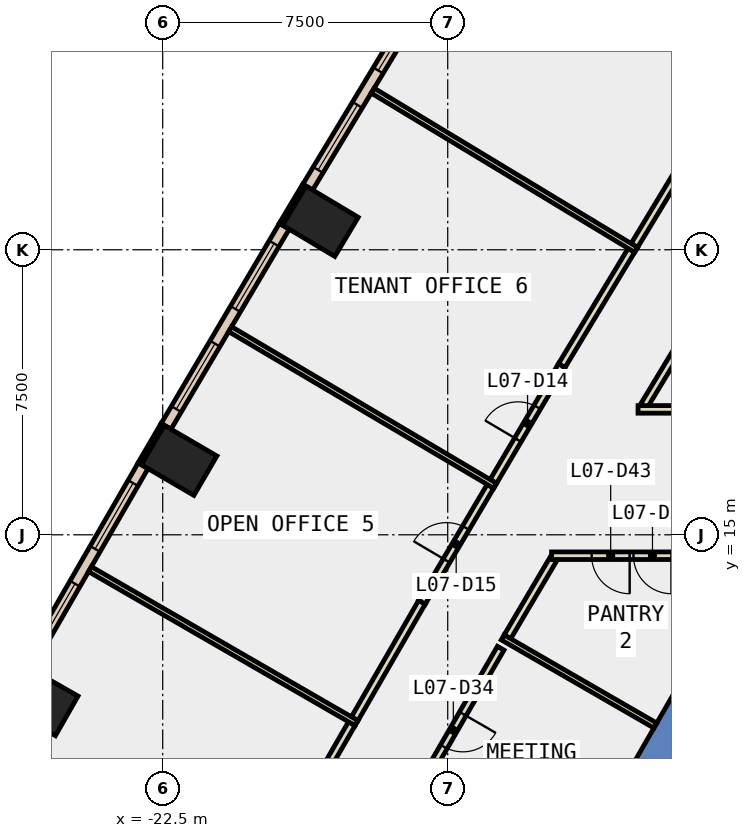
"""IFC4 building model, lengths in metres.
Left out: names, types, materials, properties, quantities, classifications, styles, units other than length and angle.
Written with IfcOpenShell. Run it as: python <this file> out.ifc"""

import sys

from ifc_helpers import new_model, si_unit, direction, frame, frame_2d, origin, origin_2d, place, context, subcontext, project, spatial, polyline, rectangle, outline, extrude, element, fill, save


model = new_model("IFC4")
c1 = context("Model", 3, precision=1e-05, world=origin(), true_north=direction((0.0, 1.0)))
c2 = subcontext(c1, "Body", "Model", "MODEL_VIEW")
j1 = project(units=[si_unit("LENGTHUNIT", "METRE"), si_unit("PLANEANGLEUNIT", "RADIAN")], contexts=[c1])
p1 = place(None, origin())
s1 = spatial("IfcSite", under=j1, at=p1, CompositionType="ELEMENT")
p2 = place(p1, origin())
s2 = spatial("IfcBuilding", under=s1, at=p2, CompositionType="ELEMENT")
p3 = place(p2, frame((0.0, 0.0, 39.2)))
s3 = spatial("IfcBuildingStorey", under=s2, at=p3, CompositionType="ELEMENT", Elevation=39.2)
for number, where, z_axis, x_axis in (
    (1, (-18.35, 23.25, -0.4), (0.0, 0.0, 1.0), (0.513, 0.858, 0.0)),
    (2, (-22.068, 16.959, -0.4), (0.0, 0.0, 1.0), (0.504, 0.864, 0.0)),
    (3, (-25.721, 10.632, -0.4), (0.0, 0.0, 1.0), (0.496, 0.869, 0.0)),
):
    element("IfcColumn", number, at=place(p3, frame(where, z_axis=z_axis, x_axis=x_axis)), inside=s3, PredefinedType="COLUMN", context=c2, shape_type="SweptSolid", body=[
        extrude(rectangle(XDim=1.2, YDim=1.6, at=origin_2d()), origin(), (0.0, 0.0, 1.0), 4.2),
    ])
p4 = place(p3, frame((0.0, 0.0, -0.4)))
e4 = element("IfcWall", 4, at=p4, inside=s3, PredefinedType="SHEAR", context=c2, shape_type="SweptSolid", body=[
    extrude(outline(polyline([(-12.267, 5.252), (-11.402, 4.752), (-6.351, 13.5), (-6.928, 14.5), (-12.267, 5.252)])), origin(), (0.0, 0.0, 1.0), 4.2),
])
p5 = place(p3, frame((-18.772, 24.201, 0.0), z_axis=(0.0, 0.0, 1.0), x_axis=(-0.513238760752, -0.858245870635, 0.0)))
e5 = element("IfcWall", 5, at=p5, inside=s3, PredefinedType="STANDARD", context=c2, shape_type="SweptSolid", body=[
    extrude(rectangle(XDim=1.2, YDim=0.1, at=frame_2d((0.6, 0.0))), origin(), (0.0, 0.0, 1.0), 3.8),
])
p6 = place(p3, frame((-22.499, 17.906, 0.0), z_axis=(0.0, 0.0, 1.0), x_axis=(-0.504313844903, -0.863520437418, 0.0)))
e6 = element("IfcWall", 6, at=p6, inside=s3, PredefinedType="STANDARD", context=c2, shape_type="SweptSolid", body=[
    extrude(rectangle(XDim=1.2, YDim=0.1, at=frame_2d((0.6, 0.0))), origin(), (0.0, 0.0, 1.0), 3.8),
])
p7 = place(p3, frame((-15.521, 29.382, 0.0), z_axis=(0.0, 0.0, 1.0), x_axis=(-0.517211293816, -0.855857743757, 0.0)))
e7 = element("IfcWall", 7, at=p7, inside=s3, PredefinedType="STANDARD", context=c2, shape_type="SweptSolid", body=[
    extrude(rectangle(XDim=6.116, YDim=0.3, at=frame_2d((3.058, 0.0))), origin(), (0.0, 0.0, 1.0), 3.8),
])
p8 = place(p7, frame((0.529, 0.0, 0.9)))
e8 = element("IfcOpeningElement", 8, at=p8, cuts=e7, PredefinedType="OPENING", context=c2, shape_type="SweptSolid", body=[
    extrude(rectangle(XDim=2.0, YDim=2.6, at=frame_2d((1.0, 1.3))), frame((0.0, 0.16, 0.0), z_axis=(0.0, -1.0, 0.0), x_axis=(1.0, 0.0, 0.0)), (0.0, 0.0, 1.0), 0.32),
])
p9 = place(p7, frame((3.587, 0.0, 0.9)))
e9 = element("IfcOpeningElement", 9, at=p9, cuts=e7, PredefinedType="OPENING", context=c2, shape_type="SweptSolid", body=[
    extrude(rectangle(XDim=2.0, YDim=2.6, at=frame_2d((1.0, 1.3))), frame((0.0, 0.16, 0.0), z_axis=(0.0, -1.0, 0.0), x_axis=(1.0, 0.0, 0.0)), (0.0, 0.0, 1.0), 0.32),
])
p10 = place(p3, frame((-19.299, 23.119, 0.0), z_axis=(0.0, 0.0, 1.0), x_axis=(-0.508749483145, -0.860914608658, 0.0)))
e10 = element("IfcWall", 10, at=p10, inside=s3, PredefinedType="STANDARD", context=c2, shape_type="SweptSolid", body=[
    extrude(rectangle(XDim=6.117, YDim=0.3, at=frame_2d((3.058, 0.0))), origin(), (0.0, 0.0, 1.0), 3.8),
])
p11 = place(p10, frame((0.529, 0.0, 0.9)))
e11 = element("IfcOpeningElement", 11, at=p11, cuts=e10, PredefinedType="OPENING", context=c2, shape_type="SweptSolid", body=[
    extrude(rectangle(XDim=2.0, YDim=2.6, at=frame_2d((1.0, 1.3))), frame((0.0, 0.16, 0.0), z_axis=(0.0, -1.0, 0.0), x_axis=(1.0, 0.0, 0.0)), (0.0, 0.0, 1.0), 0.32),
])
p12 = place(p10, frame((3.588, 0.0, 0.9)))
e12 = element("IfcOpeningElement", 12, at=p12, cuts=e10, PredefinedType="OPENING", context=c2, shape_type="SweptSolid", body=[
    extrude(rectangle(XDim=2.0, YDim=2.6, at=frame_2d((1.0, 1.3))), frame((0.0, 0.16, 0.0), z_axis=(0.0, -1.0, 0.0), x_axis=(1.0, 0.0, 0.0)), (0.0, 0.0, 1.0), 0.32),
])
p13 = place(p3, frame((-23.015, 16.819, 0.0), z_axis=(0.0, 0.0, 1.0), x_axis=(-0.499976985038, -0.866038691071, 0.0)))
e13 = element("IfcWall", 13, at=p13, inside=s3, PredefinedType="STANDARD", context=c2, shape_type="SweptSolid", body=[
    extrude(rectangle(XDim=6.116, YDim=0.3, at=frame_2d((3.058, 0.0))), origin(), (0.0, 0.0, 1.0), 3.8),
])
p14 = place(p13, frame((0.529, 0.0, 0.9)))
e14 = element("IfcOpeningElement", 14, at=p14, cuts=e13, PredefinedType="OPENING", context=c2, shape_type="SweptSolid", body=[
    extrude(rectangle(XDim=2.0, YDim=2.6, at=frame_2d((1.0, 1.3))), frame((0.0, 0.16, 0.0), z_axis=(0.0, -1.0, 0.0), x_axis=(1.0, 0.0, 0.0)), (0.0, 0.0, 1.0), 0.32),
])
p15 = place(p13, frame((3.587, 0.0, 0.9)))
e15 = element("IfcOpeningElement", 15, at=p15, cuts=e13, PredefinedType="OPENING", context=c2, shape_type="SweptSolid", body=[
    extrude(rectangle(XDim=2.0, YDim=2.6, at=frame_2d((1.0, 1.3))), frame((0.0, 0.16, 0.0), z_axis=(0.0, -1.0, 0.0), x_axis=(1.0, 0.0, 0.0)), (0.0, 0.0, 1.0), 0.32),
])
p16 = place(p3, frame((-13.606, 12.016, 0.0), z_axis=(0.0, 0.0, 1.0), x_axis=(-0.499992180995, -0.866029918042, 0.0)))
e16 = element("IfcWall", 16, at=p16, inside=s3, PredefinedType="PARTITIONING", context=c2, shape_type="SweptSolid", body=[
    extrude(rectangle(XDim=4.988, YDim=0.2, at=frame_2d((2.494, 0.0))), origin(), (0.0, 0.0, 1.0), 3.8),
])
p17 = place(p16, frame((1.994, 0.0, 0.0)))
e17 = element("IfcOpeningElement", 17, at=p17, cuts=e16, PredefinedType="OPENING", context=c2, shape_type="SweptSolid", body=[
    extrude(rectangle(XDim=1.0, YDim=2.1, at=frame_2d((0.5, 1.05))), frame((0.0, 0.11, 0.0), z_axis=(0.0, -1.0, 0.0), x_axis=(1.0, 0.0, 0.0)), (0.0, 0.0, 1.0), 0.22),
])
p18 = place(p3, frame((-12.218, 14.364, 0.0), z_axis=(0.0, 0.0, 1.0), x_axis=(-0.508767325294, -0.860904064756, 0.0)))
e18 = element("IfcWall", 18, at=p18, inside=s3, PredefinedType="PARTITIONING", context=c2, shape_type="SweptSolid", body=[
    extrude(rectangle(XDim=2.38, YDim=0.2, at=frame_2d((1.19, 0.0))), origin(), (0.0, 0.0, 1.0), 3.8),
])
p19 = place(p3, frame((-6.209, 24.392, 0.0), z_axis=(0.0, 0.0, 1.0), x_axis=(-0.51736780002, -0.85576314451, 0.0)))
e19 = element("IfcWall", 19, at=p19, inside=s3, PredefinedType="PARTITIONING", context=c2, shape_type="SweptSolid", body=[
    extrude(rectangle(XDim=7.018, YDim=0.2, at=frame_2d((3.509, 0.0))), origin(), (0.0, 0.0, 1.0), 3.8),
])
p20 = place(p3, frame((-10.089, 22.613, 0.0), z_axis=(0.0, 0.0, 1.0), x_axis=(0.517280808896, 0.855815730603, 0.0)))
e20 = element("IfcWall", 20, at=p20, inside=s3, PredefinedType="PARTITIONING", context=c2, shape_type="SweptSolid", body=[
    extrude(rectangle(XDim=3.542, YDim=0.2, at=frame_2d((1.771, 0.0))), origin(), (0.0, 0.0, 1.0), 3.8),
])
p21 = place(p3, frame((-13.8, 16.404, 0.0), z_axis=(0.0, 0.0, 1.0), x_axis=(0.508666621784, 0.860963569428, 0.0)))
e21 = element("IfcWall", 21, at=p21, inside=s3, PredefinedType="PARTITIONING", context=c2, shape_type="SweptSolid", body=[
    extrude(rectangle(XDim=3.542, YDim=0.2, at=frame_2d((1.771, 0.0))), origin(), (0.0, 0.0, 1.0), 3.8),
])
p22 = place(p21, frame((1.271, 0.0, 0.0)))
e22 = element("IfcOpeningElement", 22, at=p22, cuts=e21, PredefinedType="OPENING", context=c2, shape_type="SweptSolid", body=[
    extrude(rectangle(XDim=1.0, YDim=2.1, at=frame_2d((0.5, 1.05))), frame((0.0, 0.11, 0.0), z_axis=(0.0, -1.0, 0.0), x_axis=(1.0, 0.0, 0.0)), (0.0, 0.0, 1.0), 0.22),
])
p23 = place(p3, frame((-11.998, 19.454, 0.0), z_axis=(0.0, 0.0, 1.0), x_axis=(0.51707881094, 0.85593779171, 0.0)))
e23 = element("IfcWall", 23, at=p23, inside=s3, PredefinedType="PARTITIONING", context=c2, shape_type="SweptSolid", body=[
    extrude(rectangle(XDim=3.541, YDim=0.2, at=frame_2d((1.771, 0.0))), origin(), (0.0, 0.0, 1.0), 3.8),
])
p24 = place(p3, frame((-17.448, 10.16, 0.0), z_axis=(0.0, 0.0, 1.0), x_axis=(0.499951278228, 0.866053531485, 0.0)))
e24 = element("IfcWall", 24, at=p24, inside=s3, PredefinedType="PARTITIONING", context=c2, shape_type="SweptSolid", body=[
    extrude(rectangle(XDim=3.54, YDim=0.2, at=frame_2d((1.77, 0.0))), origin(), (0.0, 0.0, 1.0), 3.8),
])
p25 = place(p3, frame((-15.678, 13.226, 0.0), z_axis=(0.0, 0.0, 1.0), x_axis=(0.508613166028, 0.860995149431, 0.0)))
e25 = element("IfcWall", 25, at=p25, inside=s3, PredefinedType="PARTITIONING", context=c2, shape_type="SweptSolid", body=[
    extrude(rectangle(XDim=3.541, YDim=0.2, at=frame_2d((1.771, 0.0))), origin(), (0.0, 0.0, 1.0), 3.8),
])
p26 = place(p25, frame((1.271, 0.0, 0.0)))
e26 = element("IfcOpeningElement", 26, at=p26, cuts=e25, PredefinedType="OPENING", context=c2, shape_type="SweptSolid", body=[
    extrude(rectangle(XDim=1.0, YDim=2.1, at=frame_2d((0.5, 1.05))), frame((0.0, 0.11, 0.0), z_axis=(0.0, -1.0, 0.0), x_axis=(1.0, 0.0, 0.0)), (0.0, 0.0, 1.0), 0.22),
])
p27 = place(p3, frame((-19.294, 6.964, 0.0), z_axis=(0.0, 0.0, 1.0), x_axis=(0.499861717316, 0.86610522661, 0.0)))
e27 = element("IfcWall", 27, at=p27, inside=s3, PredefinedType="PARTITIONING", context=c2, shape_type="SweptSolid", body=[
    extrude(rectangle(XDim=3.541, YDim=0.2, at=frame_2d((1.771, 0.0))), origin(), (0.0, 0.0, 1.0), 3.8),
])
p28 = place(p3, frame((-13.554, 12.3, 0.0), z_axis=(0.0, 0.0, 1.0), x_axis=(0.866028685375, -0.499994316075, 0.0)))
e28 = element("IfcWall", 28, at=p28, inside=s3, PredefinedType="PARTITIONING", context=c2, shape_type="SweptSolid", body=[
    extrude(rectangle(XDim=4.638, YDim=0.15, at=frame_2d((2.319, 0.0))), origin(), (0.0, 0.0, 1.0), 3.8),
])
p29 = place(p3, frame((-6.957, 14.45, 0.0), z_axis=(0.0, 0.0, 1.0), x_axis=(-1.0, 0.0, 0.0)))
e29 = element("IfcWall", 29, at=p29, inside=s3, PredefinedType="PARTITIONING", context=c2, shape_type="SweptSolid", body=[
    extrude(rectangle(XDim=5.31, YDim=0.2, at=frame_2d((2.655, 0.0))), origin(), (0.0, 0.0, 1.0), 3.8),
])
p30 = place(p29, frame((2.155, 0.0, 0.0)))
e30 = element("IfcOpeningElement", 30, at=p30, cuts=e29, PredefinedType="OPENING", context=c2, shape_type="SweptSolid", body=[
    extrude(rectangle(XDim=1.0, YDim=2.1, at=frame_2d((0.5, 1.05))), frame((0.0, 0.11, 0.0), z_axis=(0.0, -1.0, 0.0), x_axis=(1.0, 0.0, 0.0)), (0.0, 0.0, 1.0), 0.22),
])
p31 = place(p29, frame((3.255, 0.0, 0.0)))
e31 = element("IfcOpeningElement", 31, at=p31, cuts=e29, PredefinedType="OPENING", context=c2, shape_type="SweptSolid", body=[
    extrude(rectangle(XDim=1.0, YDim=2.1, at=frame_2d((0.5, 1.05))), frame((0.0, 0.11, 0.0), z_axis=(0.0, -1.0, 0.0), x_axis=(1.0, 0.0, 0.0)), (0.0, 0.0, 1.0), 0.22),
])
p32 = place(p3, frame((-9.992, 18.3, 0.0), z_axis=(0.0, 0.0, 1.0), x_axis=(1.0, 0.0, 0.0)))
e32 = element("IfcWall", 32, at=p32, inside=s3, PredefinedType="PARTITIONING", context=c2, shape_type="SweptSolid", body=[
    extrude(rectangle(XDim=9.592, YDim=0.2, at=frame_2d((4.796, 0.0))), origin(), (0.0, 0.0, 1.0), 3.8),
])
p33 = place(p3, frame((-10.042, 22.497, 0.0), z_axis=(0.0, 0.0, 1.0), x_axis=(-0.855818252, 0.517276637346, 0.0)))
e33 = element("IfcWall", 33, at=p33, inside=s3, PredefinedType="PARTITIONING", context=c2, shape_type="SweptSolid", body=[
    extrude(rectangle(XDim=8.1, YDim=0.15, at=frame_2d((4.05, 0.0))), origin(), (0.0, 0.0, 1.0), 3.8),
])
p34 = place(p3, frame((-13.752, 16.289, 0.0), z_axis=(0.0, 0.0, 1.0), x_axis=(-0.86093852802, 0.508709004216, 0.0)))
e34 = element("IfcWall", 34, at=p34, inside=s3, PredefinedType="PARTITIONING", context=c2, shape_type="SweptSolid", body=[
    extrude(rectangle(XDim=8.101, YDim=0.15, at=frame_2d((4.05, 0.0))), origin(), (0.0, 0.0, 1.0), 3.8),
])
p35 = place(p3, frame((-17.399, 10.045, 0.0), z_axis=(0.0, 0.0, 1.0), x_axis=(-0.865980803489, 0.500077242023, 0.0)))
e35 = element("IfcWall", 35, at=p35, inside=s3, PredefinedType="PARTITIONING", context=c2, shape_type="SweptSolid", body=[
    extrude(rectangle(XDim=8.101, YDim=0.15, at=frame_2d((4.05, 0.0))), origin(), (0.0, 0.0, 1.0), 3.8),
])
p36 = place(p8, origin())
e36 = element("IfcWindow", 36, at=p36, inside=s3, PartitioningType="SINGLE_PANEL", PredefinedType="WINDOW", context=c2, shape_type="SweptSolid", body=[
    extrude(rectangle(XDim=2.0, YDim=2.6, at=frame_2d((1.0, 1.3))), frame((0.0, 0.03, 0.0), z_axis=(0.0, -1.0, 0.0), x_axis=(1.0, 0.0, 0.0)), (0.0, 0.0, 1.0), 0.06),
])
fill(e8, e36)
p37 = place(p9, origin())
e37 = element("IfcWindow", 37, at=p37, inside=s3, PartitioningType="SINGLE_PANEL", PredefinedType="WINDOW", context=c2, shape_type="SweptSolid", body=[
    extrude(rectangle(XDim=2.0, YDim=2.6, at=frame_2d((1.0, 1.3))), frame((0.0, 0.03, 0.0), z_axis=(0.0, -1.0, 0.0), x_axis=(1.0, 0.0, 0.0)), (0.0, 0.0, 1.0), 0.06),
])
fill(e9, e37)
p38 = place(p11, origin())
e38 = element("IfcWindow", 38, at=p38, inside=s3, PartitioningType="SINGLE_PANEL", PredefinedType="WINDOW", context=c2, shape_type="SweptSolid", body=[
    extrude(rectangle(XDim=2.0, YDim=2.6, at=frame_2d((1.0, 1.3))), frame((0.0, 0.03, 0.0), z_axis=(0.0, -1.0, 0.0), x_axis=(1.0, 0.0, 0.0)), (0.0, 0.0, 1.0), 0.06),
])
fill(e11, e38)
p39 = place(p12, origin())
e39 = element("IfcWindow", 39, at=p39, inside=s3, PartitioningType="SINGLE_PANEL", PredefinedType="WINDOW", context=c2, shape_type="SweptSolid", body=[
    extrude(rectangle(XDim=2.0, YDim=2.6, at=frame_2d((1.0, 1.3))), frame((0.0, 0.03, 0.0), z_axis=(0.0, -1.0, 0.0), x_axis=(1.0, 0.0, 0.0)), (0.0, 0.0, 1.0), 0.06),
])
fill(e12, e39)
p40 = place(p14, origin())
e40 = element("IfcWindow", 40, at=p40, inside=s3, PartitioningType="SINGLE_PANEL", PredefinedType="WINDOW", context=c2, shape_type="SweptSolid", body=[
    extrude(rectangle(XDim=2.0, YDim=2.6, at=frame_2d((1.0, 1.3))), frame((0.0, 0.03, 0.0), z_axis=(0.0, -1.0, 0.0), x_axis=(1.0, 0.0, 0.0)), (0.0, 0.0, 1.0), 0.06),
])
fill(e14, e40)
p41 = place(p15, origin())
e41 = element("IfcWindow", 41, at=p41, inside=s3, PartitioningType="SINGLE_PANEL", PredefinedType="WINDOW", context=c2, shape_type="SweptSolid", body=[
    extrude(rectangle(XDim=2.0, YDim=2.6, at=frame_2d((1.0, 1.3))), frame((0.0, 0.03, 0.0), z_axis=(0.0, -1.0, 0.0), x_axis=(1.0, 0.0, 0.0)), (0.0, 0.0, 1.0), 0.06),
])
fill(e15, e41)
p42 = place(p22, origin())
e42 = element("IfcDoor", 42, at=p42, inside=s3, OperationType="SINGLE_SWING_LEFT", PredefinedType="DOOR", context=c2, shape_type="SweptSolid", body=[
    extrude(rectangle(XDim=1.0, YDim=2.1, at=frame_2d((0.5, 1.05))), frame((0.0, 0.025, 0.0), z_axis=(0.0, -1.0, 0.0), x_axis=(1.0, 0.0, 0.0)), (0.0, 0.0, 1.0), 0.05),
])
fill(e22, e42)
p43 = place(p26, origin())
e43 = element("IfcDoor", 43, at=p43, inside=s3, OperationType="SINGLE_SWING_LEFT", PredefinedType="DOOR", context=c2, shape_type="SweptSolid", body=[
    extrude(rectangle(XDim=1.0, YDim=2.1, at=frame_2d((0.5, 1.05))), frame((0.0, 0.025, 0.0), z_axis=(0.0, -1.0, 0.0), x_axis=(1.0, 0.0, 0.0)), (0.0, 0.0, 1.0), 0.05),
])
fill(e26, e43)
p44 = place(p17, origin())
e44 = element("IfcDoor", 44, at=p44, inside=s3, OperationType="SINGLE_SWING_LEFT", PredefinedType="DOOR", context=c2, shape_type="SweptSolid", body=[
    extrude(rectangle(XDim=1.0, YDim=2.1, at=frame_2d((0.5, 1.05))), frame((0.0, 0.025, 0.0), z_axis=(0.0, -1.0, 0.0), x_axis=(1.0, 0.0, 0.0)), (0.0, 0.0, 1.0), 0.05),
])
fill(e17, e44)
p45 = place(p30, origin())
e45 = element("IfcDoor", 45, at=p45, inside=s3, OperationType="SINGLE_SWING_LEFT", PredefinedType="DOOR", context=c2, shape_type="SweptSolid", body=[
    extrude(rectangle(XDim=1.0, YDim=2.1, at=frame_2d((0.5, 1.05))), frame((0.0, 0.025, 0.0), z_axis=(0.0, -1.0, 0.0), x_axis=(1.0, 0.0, 0.0)), (0.0, 0.0, 1.0), 0.05),
])
fill(e30, e45)
p46 = place(p31, origin())
e46 = element("IfcDoor", 46, at=p46, inside=s3, OperationType="SINGLE_SWING_RIGHT", PredefinedType="DOOR", context=c2, shape_type="SweptSolid", body=[
    extrude(rectangle(XDim=1.0, YDim=2.1, at=frame_2d((0.5, 1.05))), frame((0.0, 0.025, 0.0), z_axis=(0.0, -1.0, 0.0), x_axis=(1.0, 0.0, 0.0)), (0.0, 0.0, 1.0), 0.05),
])
fill(e31, e46)
save(model, sys.argv[1])
